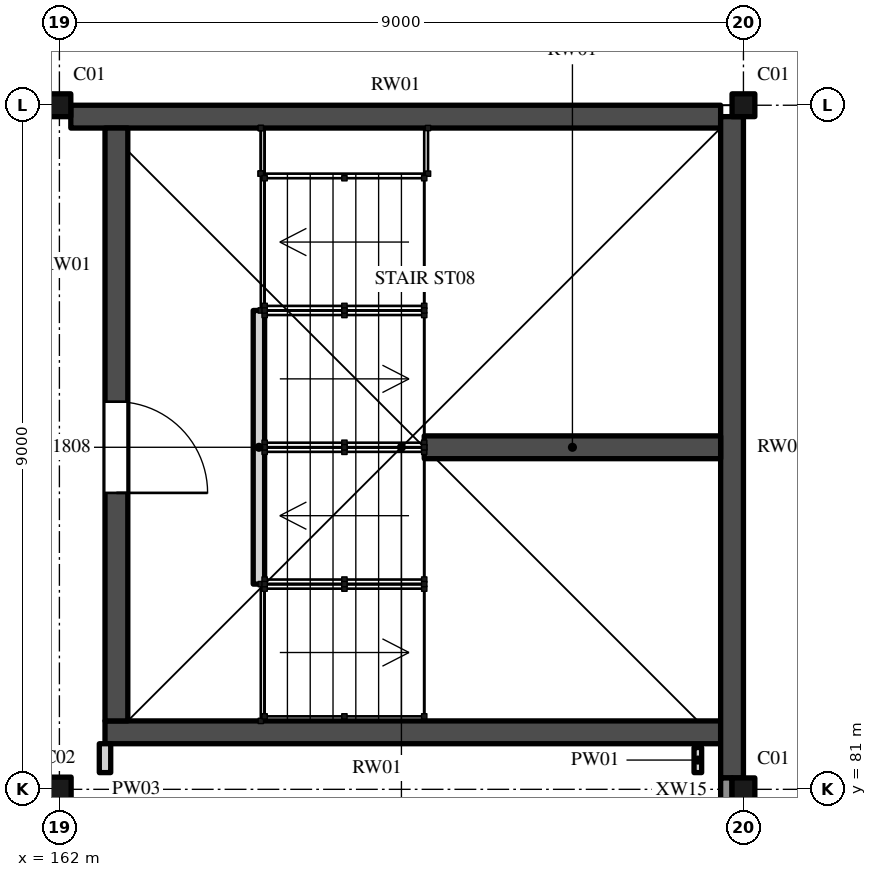
"""IFC4 building model, lengths in metres.
Left out: names, types, materials, properties, quantities, classifications, styles, units other than length and angle.
Written with IfcOpenShell. Run it as: python <this file> out.ifc"""

import sys

from ifc_helpers import new_model, si_unit, direction, frame, frame_2d, origin, origin_2d, place, context, subcontext, project, spatial, rectangle, hollow_rectangle, i_section, extrude, element, fill, save


model = new_model("IFC4")
c1 = context("Model", 3, precision=1e-05, world=origin(), true_north=direction((0.0, 1.0)))
c2 = subcontext(c1, "Body", "Model", "MODEL_VIEW")
j1 = project(units=[si_unit("LENGTHUNIT", "METRE"), si_unit("PLANEANGLEUNIT", "RADIAN")], contexts=[c1])
p1 = place(None, origin())
s1 = spatial("IfcSite", under=j1, at=p1, CompositionType="ELEMENT")
p2 = place(p1, origin())
s2 = spatial("IfcBuilding", under=s1, at=p2, CompositionType="ELEMENT")
p3 = place(p2, frame((0.0, 0.0, 6.0)))
s3 = spatial("IfcBuildingStorey", under=s2, at=p3, CompositionType="ELEMENT", Elevation=6.0)
p4 = place(p3, frame((162.0, 81.0, 0.0), z_axis=(0.0, 0.0, 1.0), x_axis=(1.0, 0.0, 0.0)))
e1 = element("IfcColumn", 1, at=p4, inside=s3, PredefinedType="COLUMN", context=c2, shape_type="SweptSolid", body=[
    extrude(i_section(OverallWidth=0.309, OverallDepth=0.321, WebThickness=0.014, FlangeThickness=0.022, FilletRadius=0.017, at=origin_2d()), origin(), (0.0, 0.0, 1.0), 5.0),
])
for number, where, z_axis, x_axis in (
    (2, (171.0, 81.0, 0.0), (0.0, 0.0, 1.0), (1.0, 0.0, 0.0)),
    (3, (162.0, 90.0, 0.0), (0.0, 0.0, 1.0), (1.0, 0.0, 0.0)),
    (4, (171.0, 90.0, 0.0), (0.0, 0.0, 1.0), (1.0, 0.0, 0.0)),
):
    element("IfcColumn", number, at=place(p3, frame(where, z_axis=z_axis, x_axis=x_axis)), inside=s3, PredefinedType="COLUMN", context=c2, shape_type="SweptSolid", body=[
        extrude(hollow_rectangle(XDim=0.3, YDim=0.3, WallThickness=0.012, InnerFilletRadius=0.019, OuterFilletRadius=0.031, at=origin_2d()), origin(), (0.0, 0.0, 1.0), 5.0),
    ])
p5 = place(p3, frame((162.6, 81.75, 0.0), z_axis=(0.0, 0.0, 1.0), x_axis=(1.0, 0.0, 0.0)))
e5 = element("IfcWall", 5, at=p5, inside=s3, PredefinedType="SHEAR", context=c2, shape_type="SweptSolid", body=[
    extrude(rectangle(XDim=8.1, YDim=0.3, at=frame_2d((4.05, 0.0))), origin(), (0.0, 0.0, 1.0), 5.0),
])
p6 = place(p3, frame((162.15, 89.85, 0.0), z_axis=(0.0, 0.0, 1.0), x_axis=(1.0, 0.0, 0.0)))
e6 = element("IfcWall", 6, at=p6, inside=s3, PredefinedType="SHEAR", context=c2, shape_type="SweptSolid", body=[
    extrude(rectangle(XDim=8.55, YDim=0.3, at=frame_2d((4.275, 0.0))), origin(), (0.0, 0.0, 1.0), 5.0),
])
p7 = place(p3, frame((162.75, 81.9, 0.0), z_axis=(0.0, 0.0, 1.0), x_axis=(0.0, 1.0, 0.0)))
e7 = element("IfcWall", 7, at=p7, inside=s3, PredefinedType="SHEAR", context=c2, shape_type="SweptSolid", body=[
    extrude(rectangle(XDim=7.8, YDim=0.3, at=frame_2d((3.9, 0.0))), origin(), (0.0, 0.0, 1.0), 5.0),
])
p8 = place(p7, frame((3.0, 0.0, 0.0)))
e8 = element("IfcOpeningElement", 8, at=p8, cuts=e7, PredefinedType="OPENING", context=c2, shape_type="SweptSolid", body=[
    extrude(rectangle(XDim=1.2, YDim=2.1, at=frame_2d((0.6, 1.05))), frame((0.0, 0.16, 0.0), z_axis=(0.0, -1.0, 0.0), x_axis=(1.0, 0.0, 0.0)), (0.0, 0.0, 1.0), 0.32),
])
p9 = place(p3, frame((170.85, 81.15, 0.0), z_axis=(0.0, 0.0, 1.0), x_axis=(0.0, 1.0, 0.0)))
e9 = element("IfcWall", 9, at=p9, inside=s3, PredefinedType="SHEAR", context=c2, shape_type="SweptSolid", body=[
    extrude(rectangle(XDim=8.7, YDim=0.3, at=frame_2d((4.35, 0.0))), origin(), (0.0, 0.0, 1.0), 5.0),
])
p10 = place(p3, frame((166.8, 85.5, 0.0), z_axis=(0.0, 0.0, 1.0), x_axis=(1.0, 0.0, 0.0)))
e10 = element("IfcWall", 10, at=p10, inside=s3, PredefinedType="SHEAR", context=c2, shape_type="SweptSolid", body=[
    extrude(rectangle(XDim=3.9, YDim=0.3, at=frame_2d((1.95, 0.0))), origin(), (0.0, 0.0, 1.0), 5.0),
])
p11 = place(p3, frame((164.625, 83.7, 0.0), z_axis=(0.0, 0.0, 1.0), x_axis=(0.0, 1.0, 0.0)))
e11 = element("IfcWall", 11, at=p11, inside=s3, PredefinedType="STANDARD", context=c2, shape_type="SweptSolid", body=[
    extrude(rectangle(XDim=3.6, YDim=0.15, at=frame_2d((1.8, 0.0))), origin(), (0.0, 0.0, 1.0), 2.3),
])
p12 = place(p3, frame((170.775, 80.828, 0.0), z_axis=(0.0, 0.0, 1.0), x_axis=(0.0, 1.0, 0.0)))
e12 = element("IfcWall", 12, at=p12, inside=s3, PredefinedType="SOLIDWALL", context=c2, shape_type="SweptSolid", body=[
    extrude(rectangle(XDim=0.322, YDim=0.15, at=frame_2d((0.161, 0.0))), origin(), (0.0, 0.0, 1.0), 5.0),
])
p13 = place(p3, frame((162.6, 81.22, 0.0), z_axis=(0.0, 0.0, 1.0), x_axis=(0.0, 1.0, 0.0)))
e13 = element("IfcWall", 13, at=p13, inside=s3, PredefinedType="PARTITIONING", context=c2, shape_type="SweptSolid", body=[
    extrude(rectangle(XDim=0.38, YDim=0.15, at=frame_2d((0.19, 0.0))), origin(), (0.0, 0.0, 1.0), 4.825),
])
p14 = place(p3, frame((170.4, 81.22, 0.0), z_axis=(0.0, 0.0, 1.0), x_axis=(0.0, 1.0, 0.0)))
e14 = element("IfcWall", 14, at=p14, inside=s3, PredefinedType="PARTITIONING", context=c2, shape_type="SweptSolid", body=[
    extrude(rectangle(XDim=0.33, YDim=0.1, at=frame_2d((0.165, 0.0))), origin(), (0.0, 0.0, 1.0), 4.825),
])
p15 = place(p8, origin())
e15 = element("IfcDoor", 15, at=p15, inside=s3, OperationType="SINGLE_SWING_LEFT", PredefinedType="DOOR", context=c2, shape_type="SweptSolid", body=[
    extrude(rectangle(XDim=1.2, YDim=2.1, at=frame_2d((0.6, 1.05))), frame((0.0, 0.025, 0.0), z_axis=(0.0, -1.0, 0.0), x_axis=(1.0, 0.0, 0.0)), (0.0, 0.0, 1.0), 0.05),
])
fill(e8, e15)
save(model, sys.argv[1])
